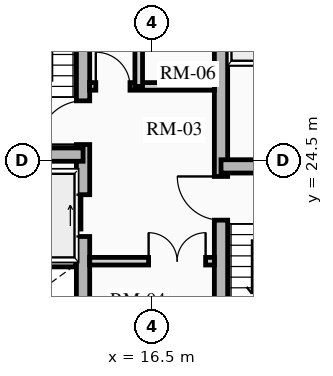
"""IFC4 building model, lengths in metres.
Left out: names, types, materials, properties, quantities, classifications, styles, units other than length and angle.
Written with IfcOpenShell. Run it as: python <this file> out.ifc"""

import sys

from ifc_helpers import new_model, si_unit, direction, frame, frame_2d, origin, place, context, subcontext, project, spatial, rectangle, extrude, source, transform, mapped, element, fill, save


model = new_model("IFC4")
c1 = context("Model", 3, precision=1e-05, world=origin(), true_north=direction((0.0, 1.0)))
c2 = subcontext(c1, "Body", "Model", "MODEL_VIEW")
j1 = project(units=[si_unit("LENGTHUNIT", "METRE"), si_unit("PLANEANGLEUNIT", "RADIAN")], contexts=[c1])
p1 = place(None, origin())
s1 = spatial("IfcSite", under=j1, at=p1, CompositionType="ELEMENT")
p2 = place(p1, origin())
s2 = spatial("IfcBuilding", under=s1, at=p2, CompositionType="ELEMENT")
p3 = place(p2, frame((0.0, 0.0, 81.79)))
s3 = spatial("IfcBuildingStorey", under=s2, at=p3, CompositionType="ELEMENT", Elevation=81.79)
p4 = place(p3, frame((14.685, 17.625, 0.0), z_axis=(0.0, 0.0, 1.0), x_axis=(0.0, 1.0, 0.0)))
e1 = element("IfcWall", 1, at=p4, inside=s3, PredefinedType="SHEAR", context=c2, shape_type="SweptSolid", body=[
    extrude(rectangle(XDim=13.75, YDim=0.35, at=frame_2d((6.875, 0.0))), origin(), (0.0, 0.0, 1.0), 2.91),
])
m1 = source(origin(), c2, "Body", "SweptSolid", [
    extrude(rectangle(XDim=1.1, YDim=2.015, at=frame_2d((0.55, 1.007))), frame((0.0, 0.185, 0.0), z_axis=(0.0, -1.0, 0.0), x_axis=(1.0, 0.0, 0.0)), (0.0, 0.0, 1.0), 0.37),
])
p5 = place(p4, frame((4.875, 0.0, 0.0)))
e2 = element("IfcOpeningElement", 2, at=p5, cuts=e1, PredefinedType="OPENING", context=c2, shape_type="MappedRepresentation", body=[
    mapped(m1, transform((0.0, 0.0, 0.0), x_axis=(1.0, 0.0, 0.0), y_axis=(0.0, 1.0, 0.0), z_axis=(0.0, 0.0, 1.0), scale=1.0)),
])
m2 = source(origin(), c2, "Body", "SweptSolid", [
    extrude(rectangle(XDim=1.15, YDim=2.02, at=frame_2d((0.575, 1.01))), frame((0.0, 0.185, 0.0), z_axis=(0.0, -1.0, 0.0), x_axis=(1.0, 0.0, 0.0)), (0.0, 0.0, 1.0), 0.37),
])
p6 = place(p4, frame((7.295, 0.0, 0.0)))
e3 = element("IfcOpeningElement", 3, at=p6, cuts=e1, PredefinedType="OPENING", context=c2, shape_type="MappedRepresentation", body=[
    mapped(m2, transform((0.0, 0.0, 0.0), x_axis=(1.0, 0.0, 0.0), y_axis=(0.0, 1.0, 0.0), z_axis=(0.0, 0.0, 1.0), scale=1.0)),
])
p7 = place(p3, frame((18.315, 17.625, 0.0), z_axis=(0.0, 0.0, 1.0), x_axis=(0.0, 1.0, 0.0)))
e4 = element("IfcWall", 4, at=p7, inside=s3, PredefinedType="SHEAR", context=c2, shape_type="SweptSolid", body=[
    extrude(rectangle(XDim=13.75, YDim=0.35, at=frame_2d((6.875, 0.0))), origin(), (0.0, 0.0, 1.0), 2.91),
])
p8 = place(p7, frame((10.0, 0.0, 0.0)))
e5 = element("IfcOpeningElement", 5, at=p8, cuts=e4, PredefinedType="OPENING", context=c2, shape_type="MappedRepresentation", body=[
    mapped(m1, transform((0.0, 0.0, 0.0), x_axis=(1.0, 0.0, 0.0), y_axis=(0.0, 1.0, 0.0), z_axis=(0.0, 0.0, 1.0), scale=1.0)),
])
p9 = place(p7, frame((12.0, 0.0, 0.0)))
e6 = element("IfcOpeningElement", 6, at=p9, cuts=e4, PredefinedType="OPENING", context=c2, shape_type="MappedRepresentation", body=[
    mapped(m1, transform((0.0, 0.0, 0.0), x_axis=(1.0, 0.0, 0.0), y_axis=(0.0, 1.0, 0.0), z_axis=(0.0, 0.0, 1.0), scale=1.0)),
])
p10 = place(p7, frame((5.305, 0.0, 0.0)))
e7 = element("IfcOpeningElement", 7, at=p10, cuts=e4, PredefinedType="OPENING", context=c2, shape_type="MappedRepresentation", body=[
    mapped(m2, transform((0.0, 0.0, 0.0), x_axis=(1.0, 0.0, 0.0), y_axis=(0.0, 1.0, 0.0), z_axis=(0.0, 0.0, 1.0), scale=1.0)),
])
for number, where, z_axis, x_axis in (
    (8, (11.4, 24.655, 0.0), (0.0, 0.0, 1.0), (1.0, 0.0, 0.0)),
    (9, (18.315, 24.345, 0.0), (0.0, 0.0, 1.0), (1.0, 0.0, 0.0)),
):
    element("IfcWall", number, at=place(p3, frame(where, z_axis=z_axis, x_axis=x_axis)), inside=s3, PredefinedType="SHEAR", context=c2, shape_type="SweptSolid", body=[
        extrude(rectangle(XDim=3.285, YDim=0.35, at=frame_2d((1.643, 0.0))), origin(), (0.0, 0.0, 1.0), 2.91),
    ])
for number, where, z_axis, x_axis in (
    (10, (11.52, 21.8, 0.0), (0.0, 0.0, 1.0), (1.0, 0.0, 0.0)),
    (11, (18.51, 27.13, 0.0), (0.0, 0.0, 1.0), (1.0, 0.0, 0.0)),
):
    element("IfcWall", number, at=place(p3, frame(where, z_axis=z_axis, x_axis=x_axis)), inside=s3, PredefinedType="SHEAR", context=c2, shape_type="SweptSolid", body=[
        extrude(rectangle(XDim=2.97, YDim=0.2, at=frame_2d((1.485, 0.0))), origin(), (0.0, 0.0, 1.0), 2.91),
    ])
p11 = place(p3, frame((14.86, 21.85, 0.0), z_axis=(0.0, 0.0, 1.0), x_axis=(1.0, 0.0, 0.0)))
e12 = element("IfcWall", 12, at=p11, inside=s3, PredefinedType="PARTITIONING", context=c2, shape_type="SweptSolid", body=[
    extrude(rectangle(XDim=3.28, YDim=0.2, at=frame_2d((1.64, 0.0))), origin(), (0.0, 0.0, 1.0), 2.655),
])
m3 = source(origin(), c2, "Body", "SweptSolid", [
    extrude(rectangle(XDim=1.5, YDim=2.02, at=frame_2d((0.75, 1.01))), frame((0.0, 0.11, 0.0), z_axis=(0.0, -1.0, 0.0), x_axis=(1.0, 0.0, 0.0)), (0.0, 0.0, 1.0), 0.22),
])
p12 = place(p11, frame((1.55, 0.0, 0.0)))
e13 = element("IfcOpeningElement", 13, at=p12, cuts=e12, PredefinedType="OPENING", context=c2, shape_type="MappedRepresentation", body=[
    mapped(m3, transform((0.0, 0.0, 0.0), x_axis=(1.0, 0.0, 0.0), y_axis=(0.0, 1.0, 0.0), z_axis=(0.0, 0.0, 1.0), scale=1.0)),
])
p13 = place(p3, frame((14.86, 26.45, 0.0), z_axis=(0.0, 0.0, 1.0), x_axis=(1.0, 0.0, 0.0)))
e14 = element("IfcWall", 14, at=p13, inside=s3, PredefinedType="PARTITIONING", context=c2, shape_type="SweptSolid", body=[
    extrude(rectangle(XDim=3.28, YDim=0.2, at=frame_2d((1.64, 0.0))), origin(), (0.0, 0.0, 1.0), 2.655),
])
m4 = source(origin(), c2, "Body", "SweptSolid", [
    extrude(rectangle(XDim=0.9, YDim=2.005, at=frame_2d((0.45, 1.002))), frame((0.0, 0.11, 0.0), z_axis=(0.0, -1.0, 0.0), x_axis=(1.0, 0.0, 0.0)), (0.0, 0.0, 1.0), 0.22),
])
p14 = place(p13, frame((0.16, 0.0, 0.0)))
e15 = element("IfcOpeningElement", 15, at=p14, cuts=e14, PredefinedType="OPENING", context=c2, shape_type="MappedRepresentation", body=[
    mapped(m4, transform((0.0, 0.0, 0.0), x_axis=(1.0, 0.0, 0.0), y_axis=(0.0, 1.0, 0.0), z_axis=(0.0, 0.0, 1.0), scale=1.0)),
])
p15 = place(p3, frame((16.15, 26.45, 0.0), z_axis=(0.0, 0.0, 1.0), x_axis=(0.0, 1.0, 0.0)))
e16 = element("IfcWall", 16, at=p15, inside=s3, PredefinedType="PARTITIONING", context=c2, shape_type="SweptSolid", body=[
    extrude(rectangle(XDim=2.4, YDim=0.2, at=frame_2d((1.2, 0.0))), origin(), (0.0, 0.0, 1.0), 2.655),
])
m5 = source(origin(), c2, "Body", "SweptSolid", [
    extrude(rectangle(XDim=1.1, YDim=2.015, at=frame_2d((0.55, 1.007))), frame((0.0, 0.025, 0.0), z_axis=(0.0, -1.0, 0.0), x_axis=(1.0, 0.0, 0.0)), (0.0, 0.0, 1.0), 0.05),
])
p16 = place(p5, origin())
e17 = element("IfcDoor", 17, at=p16, inside=s3, OperationType="SLIDING_TO_RIGHT", PredefinedType="DOOR", context=c2, shape_type="MappedRepresentation", body=[
    mapped(m5, transform((0.0, 0.0, 0.0), x_axis=(1.0, 0.0, 0.0), y_axis=(0.0, 1.0, 0.0), z_axis=(0.0, 0.0, 1.0), scale=1.0)),
])
fill(e2, e17)
m6 = source(origin(), c2, "Body", "SweptSolid", [
    extrude(rectangle(XDim=1.15, YDim=2.02, at=frame_2d((0.575, 1.01))), frame((0.0, 0.025, 0.0), z_axis=(0.0, -1.0, 0.0), x_axis=(1.0, 0.0, 0.0)), (0.0, 0.0, 1.0), 0.05),
])
p17 = place(p6, origin())
e18 = element("IfcDoor", 18, at=p17, inside=s3, OperationType="SINGLE_SWING_LEFT", PredefinedType="DOOR", context=c2, shape_type="MappedRepresentation", body=[
    mapped(m6, transform((0.0, 0.0, 0.0), x_axis=(1.0, 0.0, 0.0), y_axis=(0.0, 1.0, 0.0), z_axis=(0.0, 0.0, 1.0), scale=1.0)),
])
fill(e3, e18)
p18 = place(p10, origin())
e19 = element("IfcDoor", 19, at=p18, inside=s3, OperationType="SINGLE_SWING_RIGHT", PredefinedType="DOOR", context=c2, shape_type="MappedRepresentation", body=[
    mapped(m6, transform((0.0, 0.0, 0.0), x_axis=(1.0, 0.0, 0.0), y_axis=(0.0, 1.0, 0.0), z_axis=(0.0, 0.0, 1.0), scale=1.0)),
])
fill(e7, e19)
m7 = source(origin(), c2, "Body", "SweptSolid", [
    extrude(rectangle(XDim=1.5, YDim=2.02, at=frame_2d((0.75, 1.01))), frame((0.0, 0.025, 0.0), z_axis=(0.0, -1.0, 0.0), x_axis=(1.0, 0.0, 0.0)), (0.0, 0.0, 1.0), 0.05),
])
p19 = place(p12, origin())
e20 = element("IfcDoor", 20, at=p19, inside=s3, OperationType="DOUBLE_DOOR_SINGLE_SWING", PredefinedType="DOOR", context=c2, shape_type="MappedRepresentation", body=[
    mapped(m7, transform((0.0, 0.0, 0.0), x_axis=(1.0, 0.0, 0.0), y_axis=(0.0, 1.0, 0.0), z_axis=(0.0, 0.0, 1.0), scale=1.0)),
])
fill(e13, e20)
m8 = source(origin(), c2, "Body", "SweptSolid", [
    extrude(rectangle(XDim=0.9, YDim=2.005, at=frame_2d((0.45, 1.002))), frame((0.0, 0.025, 0.0), z_axis=(0.0, -1.0, 0.0), x_axis=(1.0, 0.0, 0.0)), (0.0, 0.0, 1.0), 0.05),
])
p20 = place(p14, origin())
e21 = element("IfcDoor", 21, at=p20, inside=s3, OperationType="SINGLE_SWING_LEFT", PredefinedType="DOOR", context=c2, shape_type="MappedRepresentation", body=[
    mapped(m8, transform((0.0, 0.0, 0.0), x_axis=(1.0, 0.0, 0.0), y_axis=(0.0, 1.0, 0.0), z_axis=(0.0, 0.0, 1.0), scale=1.0)),
])
fill(e15, e21)
save(model, sys.argv[1])
